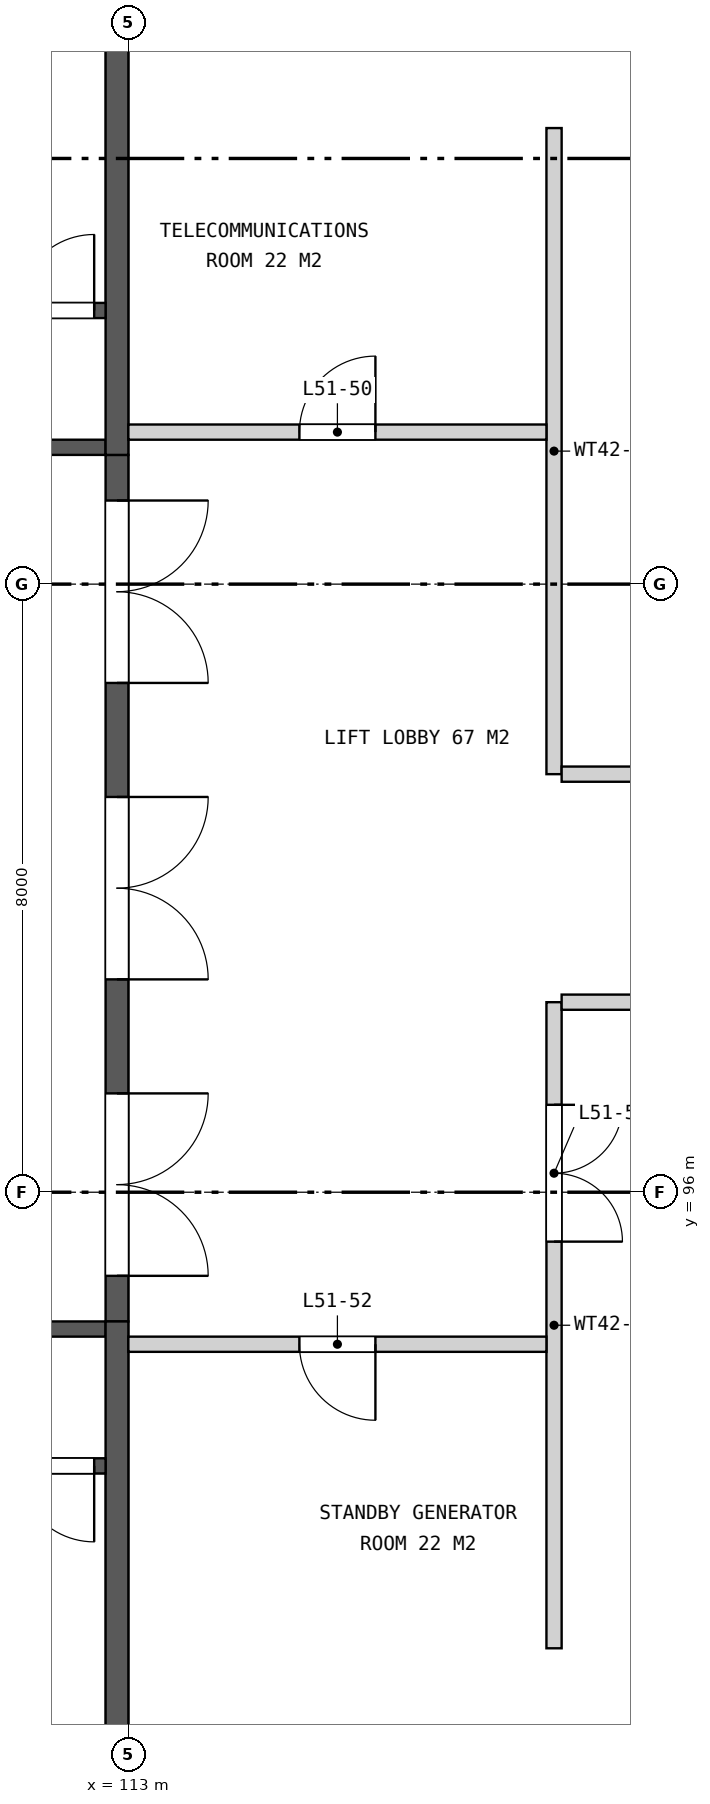
"""IFC4 building model, lengths in metres.
Left out: names, types, materials, properties, quantities, classifications, styles, units other than length and angle.
Written with IfcOpenShell. Run it as: python <this file> out.ifc"""

import sys

from ifc_helpers import new_model, si_unit, direction, frame, frame_2d, origin, place, context, subcontext, project, spatial, rectangle, extrude, element, fill, save


model = new_model("IFC4")
c1 = context("Model", 3, precision=1e-05, world=origin(), true_north=direction((0.0, 1.0)))
c2 = subcontext(c1, "Body", "Model", "MODEL_VIEW")
j1 = project(units=[si_unit("LENGTHUNIT", "METRE"), si_unit("PLANEANGLEUNIT", "RADIAN")], contexts=[c1])
p1 = place(None, origin())
s1 = spatial("IfcSite", under=j1, at=p1, CompositionType="ELEMENT")
p2 = place(p1, origin())
s2 = spatial("IfcBuilding", under=s1, at=p2, CompositionType="ELEMENT")
p3 = place(p2, frame((0.0, 0.0, 237.7)))
s3 = spatial("IfcBuildingStorey", under=s2, at=p3, CompositionType="ELEMENT", Elevation=237.7)
p4 = place(p3, frame((112.85, 105.7, 0.0), z_axis=(0.0, 0.0, 1.0), x_axis=(0.0, -1.0, 0.0)))
e1 = element("IfcWall", 1, at=p4, inside=s3, PredefinedType="SHEAR", context=c2, shape_type="SweptSolid", body=[
    extrude(rectangle(XDim=11.4, YDim=0.3, at=frame_2d((5.7, 0.0))), origin(), (0.0, 0.0, 1.0), 7.4),
])
p5 = place(p4, frame((0.6, 0.0, 0.0)))
e2 = element("IfcOpeningElement", 2, at=p5, cuts=e1, PredefinedType="OPENING", context=c2, shape_type="SweptSolid", body=[
    extrude(rectangle(XDim=2.4, YDim=2.4, at=frame_2d((1.2, 1.2))), frame((0.0, 0.16, 0.0), z_axis=(0.0, -1.0, 0.0), x_axis=(1.0, 0.0, 0.0)), (0.0, 0.0, 1.0), 0.32),
])
p6 = place(p4, frame((4.5, 0.0, 0.0)))
e3 = element("IfcOpeningElement", 3, at=p6, cuts=e1, PredefinedType="OPENING", context=c2, shape_type="SweptSolid", body=[
    extrude(rectangle(XDim=2.4, YDim=2.4, at=frame_2d((1.2, 1.2))), frame((0.0, 0.16, 0.0), z_axis=(0.0, -1.0, 0.0), x_axis=(1.0, 0.0, 0.0)), (0.0, 0.0, 1.0), 0.32),
])
p7 = place(p4, frame((8.4, 0.0, 0.0)))
e4 = element("IfcOpeningElement", 4, at=p7, cuts=e1, PredefinedType="OPENING", context=c2, shape_type="SweptSolid", body=[
    extrude(rectangle(XDim=2.4, YDim=2.4, at=frame_2d((1.2, 1.2))), frame((0.0, 0.16, 0.0), z_axis=(0.0, -1.0, 0.0), x_axis=(1.0, 0.0, 0.0)), (0.0, 0.0, 1.0), 0.32),
])
p8 = place(p3, frame((112.7, 94.2, 0.0), z_axis=(0.0, 0.0, 1.0), x_axis=(-1.0, 0.0, 0.0)))
e5 = element("IfcWall", 5, at=p8, inside=s3, PredefinedType="SHEAR", context=c2, shape_type="SweptSolid", body=[
    extrude(rectangle(XDim=15.4, YDim=0.2, at=frame_2d((7.7, 0.0))), origin(), (0.0, 0.0, 1.0), 7.4),
])
p9 = place(p8, frame((0.95, 0.0, 0.0)))
e6 = element("IfcOpeningElement", 6, at=p9, cuts=e5, PredefinedType="OPENING", context=c2, shape_type="SweptSolid", body=[
    extrude(rectangle(XDim=1.1, YDim=2.1, at=frame_2d((0.55, 1.05))), frame((0.0, 0.11, 0.0), z_axis=(0.0, -1.0, 0.0), x_axis=(1.0, 0.0, 0.0)), (0.0, 0.0, 1.0), 0.22),
])
p10 = place(p3, frame((112.85, 94.3, 0.0), z_axis=(0.0, 0.0, 1.0), x_axis=(0.0, -1.0, 0.0)))
e7 = element("IfcWall", 7, at=p10, inside=s3, PredefinedType="SHEAR", context=c2, shape_type="SweptSolid", body=[
    extrude(rectangle(XDim=6.0, YDim=0.3, at=frame_2d((3.0, 0.0))), origin(), (0.0, 0.0, 1.0), 7.4),
])
p11 = place(p3, frame((112.7, 92.4, 0.0), z_axis=(0.0, 0.0, 1.0), x_axis=(-1.0, 0.0, 0.0)))
e8 = element("IfcWall", 8, at=p11, inside=s3, PredefinedType="SHEAR", context=c2, shape_type="SweptSolid", body=[
    extrude(rectangle(XDim=6.8, YDim=0.2, at=frame_2d((3.4, 0.0))), origin(), (0.0, 0.0, 1.0), 7.4),
])
p12 = place(p11, frame((0.15, 0.0, 0.0)))
e9 = element("IfcOpeningElement", 9, at=p12, cuts=e8, PredefinedType="OPENING", context=c2, shape_type="SweptSolid", body=[
    extrude(rectangle(XDim=1.0, YDim=2.1, at=frame_2d((0.5, 1.05))), frame((0.0, 0.11, 0.0), z_axis=(0.0, -1.0, 0.0), x_axis=(1.0, 0.0, 0.0)), (0.0, 0.0, 1.0), 0.22),
])
p13 = place(p3, frame((112.7, 105.8, 0.0), z_axis=(0.0, 0.0, 1.0), x_axis=(-1.0, 0.0, 0.0)))
e10 = element("IfcWall", 10, at=p13, inside=s3, PredefinedType="SHEAR", context=c2, shape_type="SweptSolid", body=[
    extrude(rectangle(XDim=15.4, YDim=0.2, at=frame_2d((7.7, 0.0))), origin(), (0.0, 0.0, 1.0), 7.4),
])
p14 = place(p13, frame((0.95, 0.0, 0.0)))
e11 = element("IfcOpeningElement", 11, at=p14, cuts=e10, PredefinedType="OPENING", context=c2, shape_type="SweptSolid", body=[
    extrude(rectangle(XDim=1.1, YDim=2.1, at=frame_2d((0.55, 1.05))), frame((0.0, 0.11, 0.0), z_axis=(0.0, -1.0, 0.0), x_axis=(1.0, 0.0, 0.0)), (0.0, 0.0, 1.0), 0.22),
])
p15 = place(p3, frame((112.85, 111.7, 0.0), z_axis=(0.0, 0.0, 1.0), x_axis=(0.0, -1.0, 0.0)))
e12 = element("IfcWall", 12, at=p15, inside=s3, PredefinedType="SHEAR", context=c2, shape_type="SweptSolid", body=[
    extrude(rectangle(XDim=6.0, YDim=0.3, at=frame_2d((3.0, 0.0))), origin(), (0.0, 0.0, 1.0), 7.4),
])
p16 = place(p3, frame((112.7, 107.6, 0.0), z_axis=(0.0, 0.0, 1.0), x_axis=(-1.0, 0.0, 0.0)))
e13 = element("IfcWall", 13, at=p16, inside=s3, PredefinedType="SHEAR", context=c2, shape_type="SweptSolid", body=[
    extrude(rectangle(XDim=6.8, YDim=0.2, at=frame_2d((3.4, 0.0))), origin(), (0.0, 0.0, 1.0), 7.4),
])
p17 = place(p16, frame((0.15, 0.0, 0.0)))
e14 = element("IfcOpeningElement", 14, at=p17, cuts=e13, PredefinedType="OPENING", context=c2, shape_type="SweptSolid", body=[
    extrude(rectangle(XDim=1.0, YDim=2.1, at=frame_2d((0.5, 1.05))), frame((0.0, 0.11, 0.0), z_axis=(0.0, -1.0, 0.0), x_axis=(1.0, 0.0, 0.0)), (0.0, 0.0, 1.0), 0.22),
])
p18 = place(p3, frame((118.6, 90.0, 0.0), z_axis=(0.0, 0.0, 1.0), x_axis=(0.0, 1.0, 0.0)))
e15 = element("IfcWall", 15, at=p18, inside=s3, PredefinedType="SOLIDWALL", context=c2, shape_type="SweptSolid", body=[
    extrude(rectangle(XDim=8.5, YDim=0.2, at=frame_2d((4.25, 0.0))), origin(), (0.0, 0.0, 1.0), 6.643),
])
p19 = place(p18, frame((5.35, 0.0, 0.0)))
e16 = element("IfcOpeningElement", 16, at=p19, cuts=e15, PredefinedType="OPENING", context=c2, shape_type="SweptSolid", body=[
    extrude(rectangle(XDim=1.8, YDim=2.1, at=frame_2d((0.9, 1.05))), frame((0.0, 0.11, 0.0), z_axis=(0.0, -1.0, 0.0), x_axis=(1.0, 0.0, 0.0)), (0.0, 0.0, 1.0), 0.22),
])
p20 = place(p3, frame((118.6, 101.5, 0.0), z_axis=(0.0, 0.0, 1.0), x_axis=(0.0, 1.0, 0.0)))
e17 = element("IfcWall", 17, at=p20, inside=s3, PredefinedType="SOLIDWALL", context=c2, shape_type="SweptSolid", body=[
    extrude(rectangle(XDim=8.5, YDim=0.2, at=frame_2d((4.25, 0.0))), origin(), (0.0, 0.0, 1.0), 6.643),
])
p21 = place(p3, frame((113.0, 94.0, 0.0), z_axis=(0.0, 0.0, 1.0), x_axis=(1.0, 0.0, 0.0)))
e18 = element("IfcWall", 18, at=p21, inside=s3, PredefinedType="SOLIDWALL", context=c2, shape_type="SweptSolid", body=[
    extrude(rectangle(XDim=5.5, YDim=0.2, at=frame_2d((2.75, 0.0))), origin(), (0.0, 0.0, 1.0), 6.643),
])
p22 = place(p21, frame((2.25, 0.0, 0.0)))
e19 = element("IfcOpeningElement", 19, at=p22, cuts=e18, PredefinedType="OPENING", context=c2, shape_type="SweptSolid", body=[
    extrude(rectangle(XDim=1.0, YDim=2.1, at=frame_2d((0.5, 1.05))), frame((0.0, 0.11, 0.0), z_axis=(0.0, -1.0, 0.0), x_axis=(1.0, 0.0, 0.0)), (0.0, 0.0, 1.0), 0.22),
])
p23 = place(p3, frame((118.7, 98.5, 0.0), z_axis=(0.0, 0.0, 1.0), x_axis=(1.0, 0.0, 0.0)))
e20 = element("IfcWall", 20, at=p23, inside=s3, PredefinedType="SOLIDWALL", context=c2, shape_type="SweptSolid", body=[
    extrude(rectangle(XDim=12.6, YDim=0.2, at=frame_2d((6.3, 0.0))), origin(), (0.0, 0.0, 1.0), 6.643),
])
p24 = place(p23, frame((8.95, 0.0, 0.0)))
e21 = element("IfcOpeningElement", 21, at=p24, cuts=e20, PredefinedType="OPENING", context=c2, shape_type="SweptSolid", body=[
    extrude(rectangle(XDim=1.0, YDim=2.1, at=frame_2d((0.5, 1.05))), frame((0.0, 0.11, 0.0), z_axis=(0.0, -1.0, 0.0), x_axis=(1.0, 0.0, 0.0)), (0.0, 0.0, 1.0), 0.22),
])
p25 = place(p3, frame((118.7, 101.5, 0.0), z_axis=(0.0, 0.0, 1.0), x_axis=(1.0, 0.0, 0.0)))
e22 = element("IfcWall", 22, at=p25, inside=s3, PredefinedType="SOLIDWALL", context=c2, shape_type="SweptSolid", body=[
    extrude(rectangle(XDim=12.6, YDim=0.2, at=frame_2d((6.3, 0.0))), origin(), (0.0, 0.0, 1.0), 6.643),
])
p26 = place(p25, frame((2.65, 0.0, 0.0)))
e23 = element("IfcOpeningElement", 23, at=p26, cuts=e22, PredefinedType="OPENING", context=c2, shape_type="SweptSolid", body=[
    extrude(rectangle(XDim=1.0, YDim=2.1, at=frame_2d((0.5, 1.05))), frame((0.0, 0.11, 0.0), z_axis=(0.0, -1.0, 0.0), x_axis=(1.0, 0.0, 0.0)), (0.0, 0.0, 1.0), 0.22),
])
p27 = place(p3, frame((113.0, 106.0, 0.0), z_axis=(0.0, 0.0, 1.0), x_axis=(1.0, 0.0, 0.0)))
e24 = element("IfcWall", 24, at=p27, inside=s3, PredefinedType="SOLIDWALL", context=c2, shape_type="SweptSolid", body=[
    extrude(rectangle(XDim=5.5, YDim=0.2, at=frame_2d((2.75, 0.0))), origin(), (0.0, 0.0, 1.0), 6.643),
])
p28 = place(p27, frame((2.25, 0.0, 0.0)))
e25 = element("IfcOpeningElement", 25, at=p28, cuts=e24, PredefinedType="OPENING", context=c2, shape_type="SweptSolid", body=[
    extrude(rectangle(XDim=1.0, YDim=2.1, at=frame_2d((0.5, 1.05))), frame((0.0, 0.11, 0.0), z_axis=(0.0, -1.0, 0.0), x_axis=(1.0, 0.0, 0.0)), (0.0, 0.0, 1.0), 0.22),
])
p29 = place(p5, origin())
e26 = element("IfcDoor", 26, at=p29, inside=s3, OperationType="DOUBLE_DOOR_SINGLE_SWING", PredefinedType="DOOR", context=c2, shape_type="SweptSolid", body=[
    extrude(rectangle(XDim=2.4, YDim=2.4, at=frame_2d((1.2, 1.2))), frame((0.0, 0.025, 0.0), z_axis=(0.0, -1.0, 0.0), x_axis=(1.0, 0.0, 0.0)), (0.0, 0.0, 1.0), 0.05),
])
fill(e2, e26)
p30 = place(p6, origin())
e27 = element("IfcDoor", 27, at=p30, inside=s3, OperationType="DOUBLE_DOOR_SINGLE_SWING", PredefinedType="DOOR", context=c2, shape_type="SweptSolid", body=[
    extrude(rectangle(XDim=2.4, YDim=2.4, at=frame_2d((1.2, 1.2))), frame((0.0, 0.025, 0.0), z_axis=(0.0, -1.0, 0.0), x_axis=(1.0, 0.0, 0.0)), (0.0, 0.0, 1.0), 0.05),
])
fill(e3, e27)
p31 = place(p7, origin())
e28 = element("IfcDoor", 28, at=p31, inside=s3, OperationType="DOUBLE_DOOR_SINGLE_SWING", PredefinedType="DOOR", context=c2, shape_type="SweptSolid", body=[
    extrude(rectangle(XDim=2.4, YDim=2.4, at=frame_2d((1.2, 1.2))), frame((0.0, 0.025, 0.0), z_axis=(0.0, -1.0, 0.0), x_axis=(1.0, 0.0, 0.0)), (0.0, 0.0, 1.0), 0.05),
])
fill(e4, e28)
p32 = place(p12, origin())
e29 = element("IfcDoor", 29, at=p32, inside=s3, OperationType="SINGLE_SWING_LEFT", PredefinedType="DOOR", context=c2, shape_type="SweptSolid", body=[
    extrude(rectangle(XDim=1.0, YDim=2.1, at=frame_2d((0.5, 1.05))), frame((0.0, 0.025, 0.0), z_axis=(0.0, -1.0, 0.0), x_axis=(1.0, 0.0, 0.0)), (0.0, 0.0, 1.0), 0.05),
])
fill(e9, e29)
p33 = place(p17, frame((1.0, 0.0, 0.0), z_axis=(0.0, 0.0, 1.0), x_axis=(-1.0, 0.0, 0.0)))
e30 = element("IfcDoor", 30, at=p33, inside=s3, OperationType="SINGLE_SWING_RIGHT", PredefinedType="DOOR", context=c2, shape_type="SweptSolid", body=[
    extrude(rectangle(XDim=1.0, YDim=2.1, at=frame_2d((0.5, 1.05))), frame((0.0, 0.025, 0.0), z_axis=(0.0, -1.0, 0.0), x_axis=(1.0, 0.0, 0.0)), (0.0, 0.0, 1.0), 0.05),
])
fill(e14, e30)
p34 = place(p28, origin())
e31 = element("IfcDoor", 31, at=p34, inside=s3, OperationType="SINGLE_SWING_RIGHT", PredefinedType="DOOR", context=c2, shape_type="SweptSolid", body=[
    extrude(rectangle(XDim=1.0, YDim=2.1, at=frame_2d((0.5, 1.05))), frame((0.0, 0.025, 0.0), z_axis=(0.0, -1.0, 0.0), x_axis=(1.0, 0.0, 0.0)), (0.0, 0.0, 1.0), 0.05),
])
fill(e25, e31)
p35 = place(p22, frame((1.0, 0.0, 0.0), z_axis=(0.0, 0.0, 1.0), x_axis=(-1.0, 0.0, 0.0)))
e32 = element("IfcDoor", 32, at=p35, inside=s3, OperationType="SINGLE_SWING_LEFT", PredefinedType="DOOR", context=c2, shape_type="SweptSolid", body=[
    extrude(rectangle(XDim=1.0, YDim=2.1, at=frame_2d((0.5, 1.05))), frame((0.0, 0.025, 0.0), z_axis=(0.0, -1.0, 0.0), x_axis=(1.0, 0.0, 0.0)), (0.0, 0.0, 1.0), 0.05),
])
fill(e19, e32)
p36 = place(p19, frame((1.8, 0.0, 0.0), z_axis=(0.0, 0.0, 1.0), x_axis=(-1.0, 0.0, 0.0)))
e33 = element("IfcDoor", 33, at=p36, inside=s3, OperationType="DOUBLE_DOOR_SINGLE_SWING", PredefinedType="DOOR", context=c2, shape_type="SweptSolid", body=[
    extrude(rectangle(XDim=1.8, YDim=2.1, at=frame_2d((0.9, 1.05))), frame((0.0, 0.025, 0.0), z_axis=(0.0, -1.0, 0.0), x_axis=(1.0, 0.0, 0.0)), (0.0, 0.0, 1.0), 0.05),
])
fill(e16, e33)
save(model, sys.argv[1])
